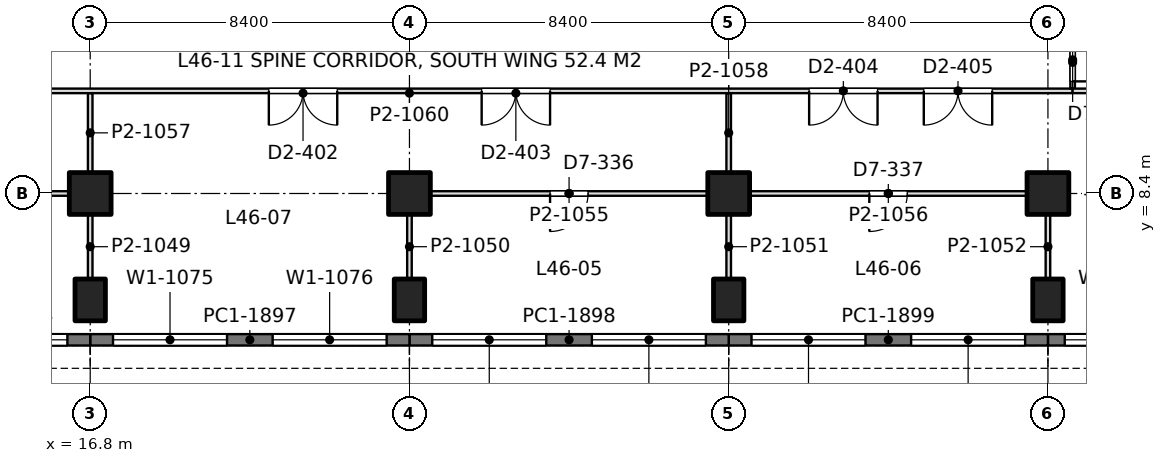
"""IFC4 building model, lengths in metres.
Left out: names, types, materials, properties, quantities, classifications, styles, units other than length and angle.
Written with IfcOpenShell. Run it as: python <this file> out.ifc"""

import sys

from ifc_helpers import new_model, si_unit, direction, frame, frame_2d, origin, origin_2d, place, context, subcontext, project, spatial, rectangle, extrude, element, fill, save


model = new_model("IFC4")
c1 = context("Model", 3, precision=1e-05, world=origin(), true_north=direction((0.0, 1.0)))
c2 = subcontext(c1, "Body", "Model", "MODEL_VIEW")
j1 = project(units=[si_unit("LENGTHUNIT", "METRE"), si_unit("PLANEANGLEUNIT", "RADIAN")], contexts=[c1])
p1 = place(None, origin())
s1 = spatial("IfcSite", under=j1, at=p1, CompositionType="ELEMENT")
p2 = place(p1, origin())
s2 = spatial("IfcBuilding", under=s1, at=p2, CompositionType="ELEMENT")
p3 = place(p2, frame((0.0, 0.0, 202.8)))
s3 = spatial("IfcBuildingStorey", under=s2, at=p3, CompositionType="ELEMENT", Elevation=202.8)
p4 = place(p3, frame((16.8, 5.6, 0.0), z_axis=(0.0, 0.0, 1.0), x_axis=(1.0, 0.0, 0.0)))
e1 = element("IfcColumn", 1, at=p4, inside=s3, PredefinedType="COLUMN", context=c2, shape_type="SweptSolid", body=[
    extrude(rectangle(XDim=0.8, YDim=1.1, at=origin_2d()), origin(), (0.0, 0.0, 1.0), 4.2),
])
p5 = place(p3, frame((16.8, 8.4, 0.0), z_axis=(0.0, 0.0, 1.0), x_axis=(1.0, 0.0, 0.0)))
e2 = element("IfcColumn", 2, at=p5, inside=s3, PredefinedType="COLUMN", context=c2, shape_type="SweptSolid", body=[
    extrude(rectangle(XDim=1.1, YDim=1.1, at=origin_2d()), origin(), (0.0, 0.0, 1.0), 4.2),
])
p6 = place(p3, frame((25.2, 5.6, 0.0), z_axis=(0.0, 0.0, 1.0), x_axis=(1.0, 0.0, 0.0)))
e3 = element("IfcColumn", 3, at=p6, inside=s3, PredefinedType="COLUMN", context=c2, shape_type="SweptSolid", body=[
    extrude(rectangle(XDim=0.8, YDim=1.1, at=origin_2d()), origin(), (0.0, 0.0, 1.0), 4.2),
])
p7 = place(p3, frame((25.2, 8.4, 0.0), z_axis=(0.0, 0.0, 1.0), x_axis=(1.0, 0.0, 0.0)))
e4 = element("IfcColumn", 4, at=p7, inside=s3, PredefinedType="COLUMN", context=c2, shape_type="SweptSolid", body=[
    extrude(rectangle(XDim=1.1, YDim=1.1, at=origin_2d()), origin(), (0.0, 0.0, 1.0), 4.2),
])
p8 = place(p3, frame((33.6, 5.6, 0.0), z_axis=(0.0, 0.0, 1.0), x_axis=(1.0, 0.0, 0.0)))
e5 = element("IfcColumn", 5, at=p8, inside=s3, PredefinedType="COLUMN", context=c2, shape_type="SweptSolid", body=[
    extrude(rectangle(XDim=0.8, YDim=1.1, at=origin_2d()), origin(), (0.0, 0.0, 1.0), 4.2),
])
p9 = place(p3, frame((33.6, 8.4, 0.0), z_axis=(0.0, 0.0, 1.0), x_axis=(1.0, 0.0, 0.0)))
e6 = element("IfcColumn", 6, at=p9, inside=s3, PredefinedType="COLUMN", context=c2, shape_type="SweptSolid", body=[
    extrude(rectangle(XDim=1.1, YDim=1.1, at=origin_2d()), origin(), (0.0, 0.0, 1.0), 4.2),
])
p10 = place(p3, frame((42.0, 5.6, 0.0), z_axis=(0.0, 0.0, 1.0), x_axis=(1.0, 0.0, 0.0)))
e7 = element("IfcColumn", 7, at=p10, inside=s3, PredefinedType="COLUMN", context=c2, shape_type="SweptSolid", body=[
    extrude(rectangle(XDim=0.8, YDim=1.1, at=origin_2d()), origin(), (0.0, 0.0, 1.0), 4.2),
])
p11 = place(p3, frame((42.0, 8.4, 0.0), z_axis=(0.0, 0.0, 1.0), x_axis=(1.0, 0.0, 0.0)))
e8 = element("IfcColumn", 8, at=p11, inside=s3, PredefinedType="COLUMN", context=c2, shape_type="SweptSolid", body=[
    extrude(rectangle(XDim=1.1, YDim=1.1, at=origin_2d()), origin(), (0.0, 0.0, 1.0), 4.2),
])
p12 = place(p3, frame((50.085, 4.55, 0.0), z_axis=(0.0, 0.0, 1.0), x_axis=(-1.0, 0.0, 0.0)))
e9 = element("IfcWall", 9, at=p12, inside=s3, PredefinedType="SOLIDWALL", context=c2, shape_type="SweptSolid", body=[
    extrude(rectangle(XDim=8.085, YDim=0.3, at=frame_2d((4.042, 0.0))), origin(), (0.0, 0.0, 1.0), 4.05),
])
p13 = place(p12, frame((0.443, 0.0, 0.9)))
e10 = element("IfcOpeningElement", 10, at=p13, cuts=e9, PredefinedType="OPENING", context=c2, shape_type="SweptSolid", body=[
    extrude(rectangle(XDim=3.0, YDim=1.9, at=frame_2d((1.5, 0.95))), frame((0.0, 0.16, 0.0), z_axis=(0.0, -1.0, 0.0), x_axis=(1.0, 0.0, 0.0)), (0.0, 0.0, 1.0), 0.32),
])
p14 = place(p12, frame((4.643, 0.0, 0.9)))
e11 = element("IfcOpeningElement", 11, at=p14, cuts=e9, PredefinedType="OPENING", context=c2, shape_type="SweptSolid", body=[
    extrude(rectangle(XDim=3.0, YDim=1.9, at=frame_2d((1.5, 0.95))), frame((0.0, 0.16, 0.0), z_axis=(0.0, -1.0, 0.0), x_axis=(1.0, 0.0, 0.0)), (0.0, 0.0, 1.0), 0.32),
])
p15 = place(p3, frame((42.0, 4.55, 0.0), z_axis=(0.0, 0.0, 1.0), x_axis=(-1.0, 0.0, 0.0)))
e12 = element("IfcWall", 12, at=p15, inside=s3, PredefinedType="SOLIDWALL", context=c2, shape_type="SweptSolid", body=[
    extrude(rectangle(XDim=8.4, YDim=0.3, at=frame_2d((4.2, 0.0))), origin(), (0.0, 0.0, 1.0), 4.05),
])
p16 = place(p15, frame((0.6, 0.0, 0.9)))
e13 = element("IfcOpeningElement", 13, at=p16, cuts=e12, PredefinedType="OPENING", context=c2, shape_type="SweptSolid", body=[
    extrude(rectangle(XDim=3.0, YDim=1.9, at=frame_2d((1.5, 0.95))), frame((0.0, 0.16, 0.0), z_axis=(0.0, -1.0, 0.0), x_axis=(1.0, 0.0, 0.0)), (0.0, 0.0, 1.0), 0.32),
])
p17 = place(p15, frame((4.8, 0.0, 0.9)))
e14 = element("IfcOpeningElement", 14, at=p17, cuts=e12, PredefinedType="OPENING", context=c2, shape_type="SweptSolid", body=[
    extrude(rectangle(XDim=3.0, YDim=1.9, at=frame_2d((1.5, 0.95))), frame((0.0, 0.16, 0.0), z_axis=(0.0, -1.0, 0.0), x_axis=(1.0, 0.0, 0.0)), (0.0, 0.0, 1.0), 0.32),
])
p18 = place(p3, frame((33.6, 4.55, 0.0), z_axis=(0.0, 0.0, 1.0), x_axis=(-1.0, 0.0, 0.0)))
e15 = element("IfcWall", 15, at=p18, inside=s3, PredefinedType="SOLIDWALL", context=c2, shape_type="SweptSolid", body=[
    extrude(rectangle(XDim=8.4, YDim=0.3, at=frame_2d((4.2, 0.0))), origin(), (0.0, 0.0, 1.0), 4.05),
])
p19 = place(p18, frame((0.6, 0.0, 0.9)))
e16 = element("IfcOpeningElement", 16, at=p19, cuts=e15, PredefinedType="OPENING", context=c2, shape_type="SweptSolid", body=[
    extrude(rectangle(XDim=3.0, YDim=1.9, at=frame_2d((1.5, 0.95))), frame((0.0, 0.16, 0.0), z_axis=(0.0, -1.0, 0.0), x_axis=(1.0, 0.0, 0.0)), (0.0, 0.0, 1.0), 0.32),
])
p20 = place(p18, frame((4.8, 0.0, 0.9)))
e17 = element("IfcOpeningElement", 17, at=p20, cuts=e15, PredefinedType="OPENING", context=c2, shape_type="SweptSolid", body=[
    extrude(rectangle(XDim=3.0, YDim=1.9, at=frame_2d((1.5, 0.95))), frame((0.0, 0.16, 0.0), z_axis=(0.0, -1.0, 0.0), x_axis=(1.0, 0.0, 0.0)), (0.0, 0.0, 1.0), 0.32),
])
p21 = place(p3, frame((25.2, 4.55, 0.0), z_axis=(0.0, 0.0, 1.0), x_axis=(-1.0, 0.0, 0.0)))
e18 = element("IfcWall", 18, at=p21, inside=s3, PredefinedType="SOLIDWALL", context=c2, shape_type="SweptSolid", body=[
    extrude(rectangle(XDim=8.4, YDim=0.3, at=frame_2d((4.2, 0.0))), origin(), (0.0, 0.0, 1.0), 4.05),
])
p22 = place(p21, frame((0.6, 0.0, 0.9)))
e19 = element("IfcOpeningElement", 19, at=p22, cuts=e18, PredefinedType="OPENING", context=c2, shape_type="SweptSolid", body=[
    extrude(rectangle(XDim=3.0, YDim=1.9, at=frame_2d((1.5, 0.95))), frame((0.0, 0.16, 0.0), z_axis=(0.0, -1.0, 0.0), x_axis=(1.0, 0.0, 0.0)), (0.0, 0.0, 1.0), 0.32),
])
p23 = place(p21, frame((4.8, 0.0, 0.9)))
e20 = element("IfcOpeningElement", 20, at=p23, cuts=e18, PredefinedType="OPENING", context=c2, shape_type="SweptSolid", body=[
    extrude(rectangle(XDim=3.0, YDim=1.9, at=frame_2d((1.5, 0.95))), frame((0.0, 0.16, 0.0), z_axis=(0.0, -1.0, 0.0), x_axis=(1.0, 0.0, 0.0)), (0.0, 0.0, 1.0), 0.32),
])
p24 = place(p3, frame((16.8, 4.55, 0.0), z_axis=(0.0, 0.0, 1.0), x_axis=(-1.0, 0.0, 0.0)))
e21 = element("IfcWall", 21, at=p24, inside=s3, PredefinedType="SOLIDWALL", context=c2, shape_type="SweptSolid", body=[
    extrude(rectangle(XDim=8.4, YDim=0.3, at=frame_2d((4.2, 0.0))), origin(), (0.0, 0.0, 1.0), 4.05),
])
p25 = place(p24, frame((0.6, 0.0, 0.9)))
e22 = element("IfcOpeningElement", 22, at=p25, cuts=e21, PredefinedType="OPENING", context=c2, shape_type="SweptSolid", body=[
    extrude(rectangle(XDim=3.0, YDim=1.9, at=frame_2d((1.5, 0.95))), frame((0.0, 0.16, 0.0), z_axis=(0.0, -1.0, 0.0), x_axis=(1.0, 0.0, 0.0)), (0.0, 0.0, 1.0), 0.32),
])
p26 = place(p24, frame((4.8, 0.0, 0.9)))
e23 = element("IfcOpeningElement", 23, at=p26, cuts=e21, PredefinedType="OPENING", context=c2, shape_type="SweptSolid", body=[
    extrude(rectangle(XDim=3.0, YDim=1.9, at=frame_2d((1.5, 0.95))), frame((0.0, 0.16, 0.0), z_axis=(0.0, -1.0, 0.0), x_axis=(1.0, 0.0, 0.0)), (0.0, 0.0, 1.0), 0.32),
])
p27 = place(p3, frame((8.949, 8.4, 0.0), z_axis=(0.0, 0.0, 1.0), x_axis=(1.0, 0.0, 0.0)))
e24 = element("IfcWall", 24, at=p27, inside=s3, PredefinedType="PARTITIONING", context=c2, shape_type="SweptSolid", body=[
    extrude(rectangle(XDim=7.302, YDim=0.12, at=frame_2d((3.651, 0.0))), origin(), (0.0, 0.0, 1.0), 3.55),
])
p28 = place(p27, frame((1.051, 0.0, 0.0)))
e25 = element("IfcOpeningElement", 25, at=p28, cuts=e24, PredefinedType="OPENING", context=c2, shape_type="SweptSolid", body=[
    extrude(rectangle(XDim=1.0, YDim=2.4, at=frame_2d((0.5, 1.2))), frame((0.0, 0.07, 0.0), z_axis=(0.0, -1.0, 0.0), x_axis=(1.0, 0.0, 0.0)), (0.0, 0.0, 1.0), 0.14),
])
p29 = place(p27, frame((5.251, 0.0, 0.0)))
e26 = element("IfcOpeningElement", 26, at=p29, cuts=e24, PredefinedType="OPENING", context=c2, shape_type="SweptSolid", body=[
    extrude(rectangle(XDim=1.0, YDim=2.4, at=frame_2d((0.5, 1.2))), frame((0.0, 0.07, 0.0), z_axis=(0.0, -1.0, 0.0), x_axis=(1.0, 0.0, 0.0)), (0.0, 0.0, 1.0), 0.14),
])
p30 = place(p3, frame((16.8, 6.149, 0.0), z_axis=(0.0, 0.0, 1.0), x_axis=(0.0, 1.0, 0.0)))
e27 = element("IfcWall", 27, at=p30, inside=s3, PredefinedType="PARTITIONING", context=c2, shape_type="SweptSolid", body=[
    extrude(rectangle(XDim=1.702, YDim=0.12, at=frame_2d((0.851, 0.0))), origin(), (0.0, 0.0, 1.0), 3.69),
])
p31 = place(p3, frame((25.749, 8.4, 0.0), z_axis=(0.0, 0.0, 1.0), x_axis=(1.0, 0.0, 0.0)))
e28 = element("IfcWall", 28, at=p31, inside=s3, PredefinedType="PARTITIONING", context=c2, shape_type="SweptSolid", body=[
    extrude(rectangle(XDim=7.302, YDim=0.12, at=frame_2d((3.651, 0.0))), origin(), (0.0, 0.0, 1.0), 3.55),
])
p32 = place(p31, frame((3.151, 0.0, 0.0)))
e29 = element("IfcOpeningElement", 29, at=p32, cuts=e28, PredefinedType="OPENING", context=c2, shape_type="SweptSolid", body=[
    extrude(rectangle(XDim=1.0, YDim=2.4, at=frame_2d((0.5, 1.2))), frame((0.0, 0.07, 0.0), z_axis=(0.0, -1.0, 0.0), x_axis=(1.0, 0.0, 0.0)), (0.0, 0.0, 1.0), 0.14),
])
p33 = place(p3, frame((34.149, 8.4, 0.0), z_axis=(0.0, 0.0, 1.0), x_axis=(1.0, 0.0, 0.0)))
e30 = element("IfcWall", 30, at=p33, inside=s3, PredefinedType="PARTITIONING", context=c2, shape_type="SweptSolid", body=[
    extrude(rectangle(XDim=7.302, YDim=0.12, at=frame_2d((3.651, 0.0))), origin(), (0.0, 0.0, 1.0), 3.55),
])
p34 = place(p33, frame((3.151, 0.0, 0.0)))
e31 = element("IfcOpeningElement", 31, at=p34, cuts=e30, PredefinedType="OPENING", context=c2, shape_type="SweptSolid", body=[
    extrude(rectangle(XDim=1.0, YDim=2.4, at=frame_2d((0.5, 1.2))), frame((0.0, 0.07, 0.0), z_axis=(0.0, -1.0, 0.0), x_axis=(1.0, 0.0, 0.0)), (0.0, 0.0, 1.0), 0.14),
])
for number, where, z_axis, x_axis in (
    (32, (25.2, 6.149, 0.0), (0.0, 0.0, 1.0), (0.0, 1.0, 0.0)),
    (33, (33.6, 6.149, 0.0), (0.0, 0.0, 1.0), (0.0, 1.0, 0.0)),
    (34, (42.0, 6.149, 0.0), (0.0, 0.0, 1.0), (0.0, 1.0, 0.0)),
):
    element("IfcWall", number, at=place(p3, frame(where, z_axis=z_axis, x_axis=x_axis)), inside=s3, PredefinedType="PARTITIONING", context=c2, shape_type="SweptSolid", body=[
        extrude(rectangle(XDim=1.702, YDim=0.12, at=frame_2d((0.851, 0.0))), origin(), (0.0, 0.0, 1.0), 3.69),
    ])
for number, where, z_axis, x_axis in (
    (35, (16.8, 8.949, 0.0), (0.0, 0.0, 1.0), (0.0, 1.0, 0.0)),
    (36, (33.6, 8.949, 0.0), (0.0, 0.0, 1.0), (0.0, 1.0, 0.0)),
):
    element("IfcWall", number, at=place(p3, frame(where, z_axis=z_axis, x_axis=x_axis)), inside=s3, PredefinedType="PARTITIONING", context=c2, shape_type="SweptSolid", body=[
        extrude(rectangle(XDim=2.093, YDim=0.12, at=frame_2d((1.046, 0.0))), origin(), (0.0, 0.0, 1.0), 3.69),
    ])
p35 = place(p3, frame((7.748, 11.1, 0.0), z_axis=(0.0, 0.0, 1.0), x_axis=(1.0, 0.0, 0.0)))
e37 = element("IfcWall", 37, at=p35, inside=s3, PredefinedType="PARTITIONING", context=c2, shape_type="SweptSolid", body=[
    extrude(rectangle(XDim=34.904, YDim=0.12, at=frame_2d((17.452, 0.0))), origin(), (0.0, 0.0, 1.0), 3.55),
])
p36 = place(p35, frame((2.119, 0.0, 0.0)))
e38 = element("IfcOpeningElement", 38, at=p36, cuts=e37, PredefinedType="OPENING", context=c2, shape_type="SweptSolid", body=[
    extrude(rectangle(XDim=1.8, YDim=2.2, at=frame_2d((0.9, 1.1))), frame((0.0, 0.07, 0.0), z_axis=(0.0, -1.0, 0.0), x_axis=(1.0, 0.0, 0.0)), (0.0, 0.0, 1.0), 0.14),
])
p37 = place(p35, frame((5.135, 0.0, 0.0)))
e39 = element("IfcOpeningElement", 39, at=p37, cuts=e37, PredefinedType="OPENING", context=c2, shape_type="SweptSolid", body=[
    extrude(rectangle(XDim=1.8, YDim=2.2, at=frame_2d((0.9, 1.1))), frame((0.0, 0.07, 0.0), z_axis=(0.0, -1.0, 0.0), x_axis=(1.0, 0.0, 0.0)), (0.0, 0.0, 1.0), 0.14),
])
p38 = place(p35, frame((13.752, 0.0, 0.0)))
e40 = element("IfcOpeningElement", 40, at=p38, cuts=e37, PredefinedType="OPENING", context=c2, shape_type="SweptSolid", body=[
    extrude(rectangle(XDim=1.8, YDim=2.2, at=frame_2d((0.9, 1.1))), frame((0.0, 0.07, 0.0), z_axis=(0.0, -1.0, 0.0), x_axis=(1.0, 0.0, 0.0)), (0.0, 0.0, 1.0), 0.14),
])
p39 = place(p35, frame((19.352, 0.0, 0.0)))
e41 = element("IfcOpeningElement", 41, at=p39, cuts=e37, PredefinedType="OPENING", context=c2, shape_type="SweptSolid", body=[
    extrude(rectangle(XDim=1.8, YDim=2.2, at=frame_2d((0.9, 1.1))), frame((0.0, 0.07, 0.0), z_axis=(0.0, -1.0, 0.0), x_axis=(1.0, 0.0, 0.0)), (0.0, 0.0, 1.0), 0.14),
])
p40 = place(p35, frame((27.969, 0.0, 0.0)))
e42 = element("IfcOpeningElement", 42, at=p40, cuts=e37, PredefinedType="OPENING", context=c2, shape_type="SweptSolid", body=[
    extrude(rectangle(XDim=1.8, YDim=2.2, at=frame_2d((0.9, 1.1))), frame((0.0, 0.07, 0.0), z_axis=(0.0, -1.0, 0.0), x_axis=(1.0, 0.0, 0.0)), (0.0, 0.0, 1.0), 0.14),
])
p41 = place(p35, frame((30.985, 0.0, 0.0)))
e43 = element("IfcOpeningElement", 43, at=p41, cuts=e37, PredefinedType="OPENING", context=c2, shape_type="SweptSolid", body=[
    extrude(rectangle(XDim=1.8, YDim=2.2, at=frame_2d((0.9, 1.1))), frame((0.0, 0.07, 0.0), z_axis=(0.0, -1.0, 0.0), x_axis=(1.0, 0.0, 0.0)), (0.0, 0.0, 1.0), 0.14),
])
p42 = place(p3, frame((42.65, 11.158, 0.0), z_axis=(0.0, 0.0, 1.0), x_axis=(0.0, 1.0, 0.0)))
e44 = element("IfcWall", 44, at=p42, inside=s3, PredefinedType="PARTITIONING", context=c2, shape_type="SweptSolid", body=[
    extrude(rectangle(XDim=1.518, YDim=0.12, at=frame_2d((0.759, 0.0))), origin(), (0.0, 0.0, 1.0), 4.05),
])
p43 = place(p42, frame((0.192, 0.0, 0.0)))
e45 = element("IfcOpeningElement", 45, at=p43, cuts=e44, PredefinedType="OPENING", context=c2, shape_type="SweptSolid", body=[
    extrude(rectangle(XDim=1.0, YDim=2.4, at=frame_2d((0.5, 1.2))), frame((0.0, 0.07, 0.0), z_axis=(0.0, -1.0, 0.0), x_axis=(1.0, 0.0, 0.0)), (0.0, 0.0, 1.0), 0.14),
])
p44 = place(p3, frame((42.648, 11.1, 0.0), z_axis=(0.0, 0.0, 1.0), x_axis=(1.0, 0.0, 0.0)))
e46 = element("IfcWall", 46, at=p44, inside=s3, PredefinedType="PARTITIONING", context=c2, shape_type="SweptSolid", body=[
    extrude(rectangle(XDim=6.552, YDim=0.12, at=frame_2d((3.276, 0.0))), origin(), (0.0, 0.0, 1.0), 4.05),
])
p45 = place(p14, origin())
e47 = element("IfcWindow", 47, at=p45, inside=s3, PartitioningType="SINGLE_PANEL", PredefinedType="WINDOW", context=c2, shape_type="SweptSolid", body=[
    extrude(rectangle(XDim=3.0, YDim=1.9, at=frame_2d((1.5, 0.95))), frame((0.0, 0.03, 0.0), z_axis=(0.0, -1.0, 0.0), x_axis=(1.0, 0.0, 0.0)), (0.0, 0.0, 1.0), 0.06),
])
fill(e11, e47)
p46 = place(p16, origin())
e48 = element("IfcWindow", 48, at=p46, inside=s3, PartitioningType="SINGLE_PANEL", PredefinedType="WINDOW", context=c2, shape_type="SweptSolid", body=[
    extrude(rectangle(XDim=3.0, YDim=1.9, at=frame_2d((1.5, 0.95))), frame((0.0, 0.03, 0.0), z_axis=(0.0, -1.0, 0.0), x_axis=(1.0, 0.0, 0.0)), (0.0, 0.0, 1.0), 0.06),
])
fill(e13, e48)
p47 = place(p17, origin())
e49 = element("IfcWindow", 49, at=p47, inside=s3, PartitioningType="SINGLE_PANEL", PredefinedType="WINDOW", context=c2, shape_type="SweptSolid", body=[
    extrude(rectangle(XDim=3.0, YDim=1.9, at=frame_2d((1.5, 0.95))), frame((0.0, 0.03, 0.0), z_axis=(0.0, -1.0, 0.0), x_axis=(1.0, 0.0, 0.0)), (0.0, 0.0, 1.0), 0.06),
])
fill(e14, e49)
p48 = place(p19, origin())
e50 = element("IfcWindow", 50, at=p48, inside=s3, PartitioningType="SINGLE_PANEL", PredefinedType="WINDOW", context=c2, shape_type="SweptSolid", body=[
    extrude(rectangle(XDim=3.0, YDim=1.9, at=frame_2d((1.5, 0.95))), frame((0.0, 0.03, 0.0), z_axis=(0.0, -1.0, 0.0), x_axis=(1.0, 0.0, 0.0)), (0.0, 0.0, 1.0), 0.06),
])
fill(e16, e50)
p49 = place(p20, origin())
e51 = element("IfcWindow", 51, at=p49, inside=s3, PartitioningType="SINGLE_PANEL", PredefinedType="WINDOW", context=c2, shape_type="SweptSolid", body=[
    extrude(rectangle(XDim=3.0, YDim=1.9, at=frame_2d((1.5, 0.95))), frame((0.0, 0.03, 0.0), z_axis=(0.0, -1.0, 0.0), x_axis=(1.0, 0.0, 0.0)), (0.0, 0.0, 1.0), 0.06),
])
fill(e17, e51)
p50 = place(p22, origin())
e52 = element("IfcWindow", 52, at=p50, inside=s3, PartitioningType="SINGLE_PANEL", PredefinedType="WINDOW", context=c2, shape_type="SweptSolid", body=[
    extrude(rectangle(XDim=3.0, YDim=1.9, at=frame_2d((1.5, 0.95))), frame((0.0, 0.03, 0.0), z_axis=(0.0, -1.0, 0.0), x_axis=(1.0, 0.0, 0.0)), (0.0, 0.0, 1.0), 0.06),
])
fill(e19, e52)
p51 = place(p23, origin())
e53 = element("IfcWindow", 53, at=p51, inside=s3, PartitioningType="SINGLE_PANEL", PredefinedType="WINDOW", context=c2, shape_type="SweptSolid", body=[
    extrude(rectangle(XDim=3.0, YDim=1.9, at=frame_2d((1.5, 0.95))), frame((0.0, 0.03, 0.0), z_axis=(0.0, -1.0, 0.0), x_axis=(1.0, 0.0, 0.0)), (0.0, 0.0, 1.0), 0.06),
])
fill(e20, e53)
p52 = place(p25, origin())
e54 = element("IfcWindow", 54, at=p52, inside=s3, PartitioningType="SINGLE_PANEL", PredefinedType="WINDOW", context=c2, shape_type="SweptSolid", body=[
    extrude(rectangle(XDim=3.0, YDim=1.9, at=frame_2d((1.5, 0.95))), frame((0.0, 0.03, 0.0), z_axis=(0.0, -1.0, 0.0), x_axis=(1.0, 0.0, 0.0)), (0.0, 0.0, 1.0), 0.06),
])
fill(e22, e54)
p53 = place(p32, frame((1.0, 0.0, 0.0), z_axis=(0.0, 0.0, 1.0), x_axis=(-1.0, 0.0, 0.0)))
e55 = element("IfcDoor", 55, at=p53, inside=s3, OperationType="SINGLE_SWING_RIGHT", PredefinedType="DOOR", context=c2, shape_type="SweptSolid", body=[
    extrude(rectangle(XDim=1.0, YDim=2.4, at=frame_2d((0.5, 1.2))), frame((0.0, 0.025, 0.0), z_axis=(0.0, -1.0, 0.0), x_axis=(1.0, 0.0, 0.0)), (0.0, 0.0, 1.0), 0.05),
])
fill(e29, e55)
p54 = place(p34, frame((1.0, 0.0, 0.0), z_axis=(0.0, 0.0, 1.0), x_axis=(-1.0, 0.0, 0.0)))
e56 = element("IfcDoor", 56, at=p54, inside=s3, OperationType="SINGLE_SWING_RIGHT", PredefinedType="DOOR", context=c2, shape_type="SweptSolid", body=[
    extrude(rectangle(XDim=1.0, YDim=2.4, at=frame_2d((0.5, 1.2))), frame((0.0, 0.025, 0.0), z_axis=(0.0, -1.0, 0.0), x_axis=(1.0, 0.0, 0.0)), (0.0, 0.0, 1.0), 0.05),
])
fill(e31, e56)
p55 = place(p38, frame((1.8, 0.0, 0.0), z_axis=(0.0, 0.0, 1.0), x_axis=(-1.0, 0.0, 0.0)))
e57 = element("IfcDoor", 57, at=p55, inside=s3, OperationType="DOUBLE_DOOR_SINGLE_SWING", PredefinedType="DOOR", context=c2, shape_type="SweptSolid", body=[
    extrude(rectangle(XDim=1.8, YDim=2.2, at=frame_2d((0.9, 1.1))), frame((0.0, 0.025, 0.0), z_axis=(0.0, -1.0, 0.0), x_axis=(1.0, 0.0, 0.0)), (0.0, 0.0, 1.0), 0.05),
])
fill(e40, e57)
p56 = place(p39, frame((1.8, 0.0, 0.0), z_axis=(0.0, 0.0, 1.0), x_axis=(-1.0, 0.0, 0.0)))
e58 = element("IfcDoor", 58, at=p56, inside=s3, OperationType="DOUBLE_DOOR_SINGLE_SWING", PredefinedType="DOOR", context=c2, shape_type="SweptSolid", body=[
    extrude(rectangle(XDim=1.8, YDim=2.2, at=frame_2d((0.9, 1.1))), frame((0.0, 0.025, 0.0), z_axis=(0.0, -1.0, 0.0), x_axis=(1.0, 0.0, 0.0)), (0.0, 0.0, 1.0), 0.05),
])
fill(e41, e58)
p57 = place(p40, frame((1.8, 0.0, 0.0), z_axis=(0.0, 0.0, 1.0), x_axis=(-1.0, 0.0, 0.0)))
e59 = element("IfcDoor", 59, at=p57, inside=s3, OperationType="DOUBLE_DOOR_SINGLE_SWING", PredefinedType="DOOR", context=c2, shape_type="SweptSolid", body=[
    extrude(rectangle(XDim=1.8, YDim=2.2, at=frame_2d((0.9, 1.1))), frame((0.0, 0.025, 0.0), z_axis=(0.0, -1.0, 0.0), x_axis=(1.0, 0.0, 0.0)), (0.0, 0.0, 1.0), 0.05),
])
fill(e42, e59)
p58 = place(p41, frame((1.8, 0.0, 0.0), z_axis=(0.0, 0.0, 1.0), x_axis=(-1.0, 0.0, 0.0)))
e60 = element("IfcDoor", 60, at=p58, inside=s3, OperationType="DOUBLE_DOOR_SINGLE_SWING", PredefinedType="DOOR", context=c2, shape_type="SweptSolid", body=[
    extrude(rectangle(XDim=1.8, YDim=2.2, at=frame_2d((0.9, 1.1))), frame((0.0, 0.025, 0.0), z_axis=(0.0, -1.0, 0.0), x_axis=(1.0, 0.0, 0.0)), (0.0, 0.0, 1.0), 0.05),
])
fill(e43, e60)
p59 = place(p43, frame((1.0, 0.0, 0.0), z_axis=(0.0, 0.0, 1.0), x_axis=(-1.0, 0.0, 0.0)))
e61 = element("IfcDoor", 61, at=p59, inside=s3, OperationType="SINGLE_SWING_RIGHT", PredefinedType="DOOR", context=c2, shape_type="SweptSolid", body=[
    extrude(rectangle(XDim=1.0, YDim=2.4, at=frame_2d((0.5, 1.2))), frame((0.0, 0.025, 0.0), z_axis=(0.0, -1.0, 0.0), x_axis=(1.0, 0.0, 0.0)), (0.0, 0.0, 1.0), 0.05),
])
fill(e45, e61)
save(model, sys.argv[1])
